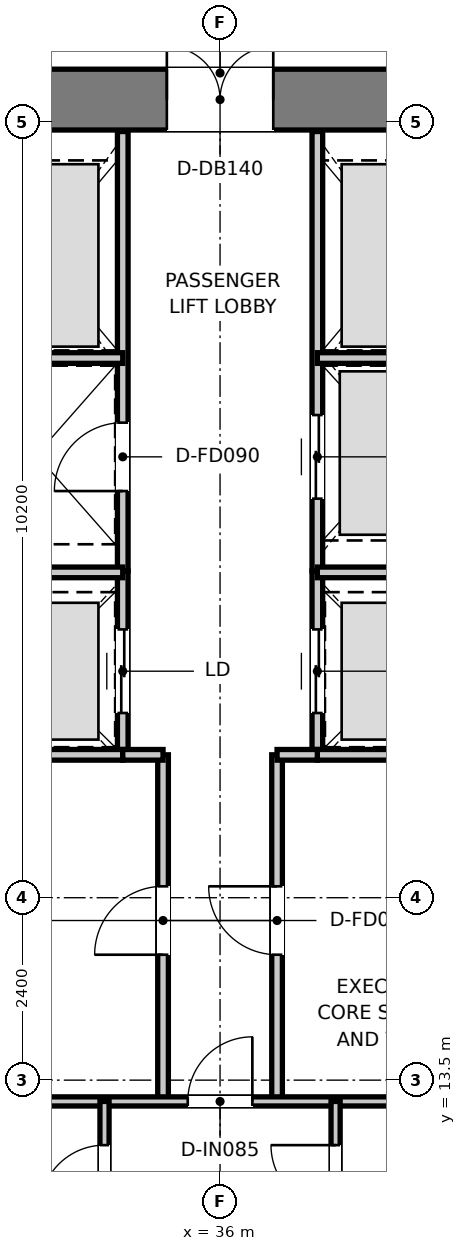
"""IFC4 building model, lengths in metres.
Left out: names, types, materials, properties, quantities, classifications, styles, units other than length and angle.
Written with IfcOpenShell. Run it as: python <this file> out.ifc"""

import sys

from ifc_helpers import new_model, si_unit, direction, frame, frame_2d, origin, place, context, subcontext, project, spatial, rectangle, extrude, element, fill, save


model = new_model("IFC4")
c1 = context("Model", 3, precision=1e-05, world=origin(), true_north=direction((0.0, 1.0)))
c2 = subcontext(c1, "Body", "Model", "MODEL_VIEW")
j1 = project(units=[si_unit("LENGTHUNIT", "METRE"), si_unit("PLANEANGLEUNIT", "RADIAN")], contexts=[c1])
p1 = place(None, origin())
s1 = spatial("IfcSite", under=j1, at=p1, CompositionType="ELEMENT")
p2 = place(p1, origin())
s2 = spatial("IfcBuilding", under=s1, at=p2, CompositionType="ELEMENT")
p3 = place(p2, frame((0.0, 0.0, 331.65)))
s3 = spatial("IfcBuildingStorey", under=s2, at=p3, CompositionType="ELEMENT", Elevation=331.65)
p4 = place(p3, frame((28.08, 26.4, 0.0), z_axis=(0.0, 0.0, 1.0), x_axis=(1.0, 0.0, 0.0)))
e1 = element("IfcWall", 1, at=p4, inside=s3, PredefinedType="SHEAR", context=c2, shape_type="SweptSolid", body=[
    extrude(rectangle(XDim=15.84, YDim=0.8, at=frame_2d((7.92, 0.0))), origin(), (0.0, 0.0, 1.0), 3.95),
])
p5 = place(p4, frame((7.22, 0.0, 0.0)))
e2 = element("IfcOpeningElement", 2, at=p5, cuts=e1, PredefinedType="OPENING", context=c2, shape_type="SweptSolid", body=[
    extrude(rectangle(XDim=1.4, YDim=2.2, at=frame_2d((0.7, 1.1))), frame((0.0, 0.41, 0.0), z_axis=(0.0, -1.0, 0.0), x_axis=(1.0, 0.0, 0.0)), (0.0, 0.0, 1.0), 0.82),
])
p6 = place(p4, frame((1.775, 0.0, 0.0)))
e3 = element("IfcOpeningElement", 3, at=p6, cuts=e1, PredefinedType="OPENING", context=c2, shape_type="SweptSolid", body=[
    extrude(rectangle(XDim=1.05, YDim=2.1, at=frame_2d((0.525, 1.05))), frame((0.0, 0.41, 0.0), z_axis=(0.0, -1.0, 0.0), x_axis=(1.0, 0.0, 0.0)), (0.0, 0.0, 1.0), 0.82),
])
p7 = place(p4, frame((13.015, 0.0, 0.0)))
e4 = element("IfcOpeningElement", 4, at=p7, cuts=e1, PredefinedType="OPENING", context=c2, shape_type="SweptSolid", body=[
    extrude(rectangle(XDim=1.05, YDim=2.1, at=frame_2d((0.525, 1.05))), frame((0.0, 0.41, 0.0), z_axis=(0.0, -1.0, 0.0), x_axis=(1.0, 0.0, 0.0)), (0.0, 0.0, 1.0), 0.82),
])
p8 = place(p3, frame((34.72, 20.2, 0.0), z_axis=(0.0, 0.0, 1.0), x_axis=(0.0, 1.0, 0.0)))
e5 = element("IfcWall", 5, at=p8, inside=s3, PredefinedType="PARTITIONING", context=c2, shape_type="SweptSolid", body=[
    extrude(rectangle(XDim=5.78, YDim=0.14, at=frame_2d((2.89, 0.0))), origin(), (0.0, 0.0, 1.0), 2.82),
])
p9 = place(p8, frame((1.05, 0.0, 0.0)))
e6 = element("IfcOpeningElement", 6, at=p9, cuts=e5, PredefinedType="OPENING", context=c2, shape_type="SweptSolid", body=[
    extrude(rectangle(XDim=0.9, YDim=2.1, at=frame_2d((0.45, 1.05))), frame((0.0, 0.08, 0.0), z_axis=(0.0, -1.0, 0.0), x_axis=(1.0, 0.0, 0.0)), (0.0, 0.0, 1.0), 0.16),
])
p10 = place(p3, frame((37.28, 20.2, 0.0), z_axis=(0.0, 0.0, 1.0), x_axis=(0.0, 1.0, 0.0)))
e7 = element("IfcWall", 7, at=p10, inside=s3, PredefinedType="PARTITIONING", context=c2, shape_type="SweptSolid", body=[
    extrude(rectangle(XDim=5.78, YDim=0.14, at=frame_2d((2.89, 0.0))), origin(), (0.0, 0.0, 1.0), 2.82),
])
p11 = place(p10, frame((0.95, 0.0, 0.0)))
e8 = element("IfcOpeningElement", 8, at=p11, cuts=e7, PredefinedType="OPENING", context=c2, shape_type="SweptSolid", body=[
    extrude(rectangle(XDim=1.1, YDim=2.15, at=frame_2d((0.55, 1.075))), frame((0.0, 0.08, 0.0), z_axis=(0.0, -1.0, 0.0), x_axis=(1.0, 0.0, 0.0)), (0.0, 0.0, 1.0), 0.16),
])
for number, where, z_axis, x_axis in (
    (9, (32.45, 23.0, 0.0), (0.0, 0.0, 1.0), (1.0, 0.0, 0.0)),
    (10, (37.28, 23.0, 0.0), (0.0, 0.0, 1.0), (1.0, 0.0, 0.0)),
):
    element("IfcWall", number, at=place(p3, frame(where, z_axis=z_axis, x_axis=x_axis)), inside=s3, PredefinedType="PARTITIONING", context=c2, shape_type="SweptSolid", body=[
        extrude(rectangle(XDim=2.27, YDim=0.14, at=frame_2d((1.135, 0.0))), origin(), (0.0, 0.0, 1.0), 2.82),
    ])
p12 = place(p3, frame((34.72, 17.78, 0.0), z_axis=(0.0, 0.0, 1.0), x_axis=(0.0, 1.0, 0.0)))
e11 = element("IfcWall", 11, at=p12, inside=s3, PredefinedType="PARTITIONING", context=c2, shape_type="SweptSolid", body=[
    extrude(rectangle(XDim=2.42, YDim=0.14, at=frame_2d((1.21, 0.0))), origin(), (0.0, 0.0, 1.0), 3.67),
])
p13 = place(p12, frame((0.55, 0.0, 0.0)))
e12 = element("IfcOpeningElement", 12, at=p13, cuts=e11, PredefinedType="OPENING", context=c2, shape_type="SweptSolid", body=[
    extrude(rectangle(XDim=1.1, YDim=2.15, at=frame_2d((0.55, 1.075))), frame((0.0, 0.08, 0.0), z_axis=(0.0, -1.0, 0.0), x_axis=(1.0, 0.0, 0.0)), (0.0, 0.0, 1.0), 0.16),
])
p14 = place(p3, frame((37.28, 17.78, 0.0), z_axis=(0.0, 0.0, 1.0), x_axis=(0.0, 1.0, 0.0)))
e13 = element("IfcWall", 13, at=p14, inside=s3, PredefinedType="PARTITIONING", context=c2, shape_type="SweptSolid", body=[
    extrude(rectangle(XDim=2.42, YDim=0.14, at=frame_2d((1.21, 0.0))), origin(), (0.0, 0.0, 1.0), 3.67),
])
p15 = place(p14, frame((0.55, 0.0, 0.0)))
e14 = element("IfcOpeningElement", 14, at=p15, cuts=e13, PredefinedType="OPENING", context=c2, shape_type="SweptSolid", body=[
    extrude(rectangle(XDim=1.1, YDim=2.15, at=frame_2d((0.55, 1.075))), frame((0.0, 0.08, 0.0), z_axis=(0.0, -1.0, 0.0), x_axis=(1.0, 0.0, 0.0)), (0.0, 0.0, 1.0), 0.16),
])
for number, where, z_axis, x_axis in (
    (15, (32.45, 17.78, 0.0), (0.0, 0.0, 1.0), (1.0, 0.0, 0.0)),
    (16, (32.45, 20.18, 0.0), (0.0, 0.0, 1.0), (1.0, 0.0, 0.0)),
    (17, (37.28, 17.78, 0.0), (0.0, 0.0, 1.0), (1.0, 0.0, 0.0)),
    (18, (37.28, 20.18, 0.0), (0.0, 0.0, 1.0), (1.0, 0.0, 0.0)),
):
    element("IfcWall", number, at=place(p3, frame(where, z_axis=z_axis, x_axis=x_axis)), inside=s3, PredefinedType="PARTITIONING", context=c2, shape_type="SweptSolid", body=[
        extrude(rectangle(XDim=2.27, YDim=0.14, at=frame_2d((1.135, 0.0))), origin(), (0.0, 0.0, 1.0), 3.67),
    ])
p16 = place(p3, frame((35.25, 13.22, 0.0), z_axis=(0.0, 0.0, 1.0), x_axis=(0.0, 1.0, 0.0)))
e19 = element("IfcWall", 19, at=p16, inside=s3, PredefinedType="PARTITIONING", context=c2, shape_type="SweptSolid", body=[
    extrude(rectangle(XDim=4.56, YDim=0.14, at=frame_2d((2.28, 0.0))), origin(), (0.0, 0.0, 1.0), 3.67),
])
p17 = place(p16, frame((1.93, 0.0, 0.0)))
e20 = element("IfcOpeningElement", 20, at=p17, cuts=e19, PredefinedType="OPENING", context=c2, shape_type="SweptSolid", body=[
    extrude(rectangle(XDim=0.9, YDim=2.1, at=frame_2d((0.45, 1.05))), frame((0.0, 0.08, 0.0), z_axis=(0.0, -1.0, 0.0), x_axis=(1.0, 0.0, 0.0)), (0.0, 0.0, 1.0), 0.16),
])
p18 = place(p3, frame((34.72, 17.78, 0.0), z_axis=(0.0, 0.0, 1.0), x_axis=(1.0, 0.0, 0.0)))
e21 = element("IfcWall", 21, at=p18, inside=s3, PredefinedType="PARTITIONING", context=c2, shape_type="SweptSolid", body=[
    extrude(rectangle(XDim=0.53, YDim=0.14, at=frame_2d((0.265, 0.0))), origin(), (0.0, 0.0, 1.0), 3.67),
])
p19 = place(p3, frame((36.75, 13.22, 0.0), z_axis=(0.0, 0.0, 1.0), x_axis=(0.0, 1.0, 0.0)))
e22 = element("IfcWall", 22, at=p19, inside=s3, PredefinedType="PARTITIONING", context=c2, shape_type="SweptSolid", body=[
    extrude(rectangle(XDim=4.56, YDim=0.14, at=frame_2d((2.28, 0.0))), origin(), (0.0, 0.0, 1.0), 3.67),
])
p20 = place(p19, frame((1.93, 0.0, 0.0)))
e23 = element("IfcOpeningElement", 23, at=p20, cuts=e22, PredefinedType="OPENING", context=c2, shape_type="SweptSolid", body=[
    extrude(rectangle(XDim=0.9, YDim=2.1, at=frame_2d((0.45, 1.05))), frame((0.0, 0.08, 0.0), z_axis=(0.0, -1.0, 0.0), x_axis=(1.0, 0.0, 0.0)), (0.0, 0.0, 1.0), 0.16),
])
p21 = place(p3, frame((36.75, 17.78, 0.0), z_axis=(0.0, 0.0, 1.0), x_axis=(1.0, 0.0, 0.0)))
e24 = element("IfcWall", 24, at=p21, inside=s3, PredefinedType="PARTITIONING", context=c2, shape_type="SweptSolid", body=[
    extrude(rectangle(XDim=0.53, YDim=0.14, at=frame_2d((0.265, 0.0))), origin(), (0.0, 0.0, 1.0), 3.67),
])
p22 = place(p3, frame((32.21, 13.22, 0.0), z_axis=(0.0, 0.0, 1.0), x_axis=(1.0, 0.0, 0.0)))
e25 = element("IfcWall", 25, at=p22, inside=s3, PredefinedType="PARTITIONING", context=c2, shape_type="SweptSolid", body=[
    extrude(rectangle(XDim=7.58, YDim=0.12, at=frame_2d((3.79, 0.0))), origin(), (0.0, 0.0, 1.0), 3.67),
])
p23 = place(p22, frame((3.365, 0.0, 0.0)))
e26 = element("IfcOpeningElement", 26, at=p23, cuts=e25, PredefinedType="OPENING", context=c2, shape_type="SweptSolid", body=[
    extrude(rectangle(XDim=0.85, YDim=2.1, at=frame_2d((0.425, 1.05))), frame((0.0, 0.07, 0.0), z_axis=(0.0, -1.0, 0.0), x_axis=(1.0, 0.0, 0.0)), (0.0, 0.0, 1.0), 0.14),
])
p24 = place(p3, frame((34.48, 11.25, 0.0), z_axis=(0.0, 0.0, 1.0), x_axis=(0.0, 1.0, 0.0)))
e27 = element("IfcWall", 27, at=p24, inside=s3, PredefinedType="PARTITIONING", context=c2, shape_type="SweptSolid", body=[
    extrude(rectangle(XDim=1.97, YDim=0.12, at=frame_2d((0.985, 0.0))), origin(), (0.0, 0.0, 1.0), 3.67),
])
p25 = place(p24, frame((0.545, 0.0, 0.0)))
e28 = element("IfcOpeningElement", 28, at=p25, cuts=e27, PredefinedType="OPENING", context=c2, shape_type="SweptSolid", body=[
    extrude(rectangle(XDim=0.85, YDim=2.1, at=frame_2d((0.425, 1.05))), frame((0.0, 0.07, 0.0), z_axis=(0.0, -1.0, 0.0), x_axis=(1.0, 0.0, 0.0)), (0.0, 0.0, 1.0), 0.14),
])
p26 = place(p3, frame((37.52, 11.25, 0.0), z_axis=(0.0, 0.0, 1.0), x_axis=(0.0, 1.0, 0.0)))
e29 = element("IfcWall", 29, at=p26, inside=s3, PredefinedType="PARTITIONING", context=c2, shape_type="SweptSolid", body=[
    extrude(rectangle(XDim=1.97, YDim=0.12, at=frame_2d((0.985, 0.0))), origin(), (0.0, 0.0, 1.0), 3.67),
])
p27 = place(p26, frame((0.545, 0.0, 0.0)))
e30 = element("IfcOpeningElement", 30, at=p27, cuts=e29, PredefinedType="OPENING", context=c2, shape_type="SweptSolid", body=[
    extrude(rectangle(XDim=0.85, YDim=2.1, at=frame_2d((0.425, 1.05))), frame((0.0, 0.07, 0.0), z_axis=(0.0, -1.0, 0.0), x_axis=(1.0, 0.0, 0.0)), (0.0, 0.0, 1.0), 0.14),
])
p28 = place(p5, origin())
e31 = element("IfcDoor", 31, at=p28, inside=s3, OperationType="DOUBLE_DOOR_SINGLE_SWING", PredefinedType="DOOR", context=c2, shape_type="SweptSolid", body=[
    extrude(rectangle(XDim=1.4, YDim=2.2, at=frame_2d((0.7, 1.1))), frame((0.0, 0.025, 0.0), z_axis=(0.0, -1.0, 0.0), x_axis=(1.0, 0.0, 0.0)), (0.0, 0.0, 1.0), 0.05),
])
fill(e2, e31)
p29 = place(p9, origin())
e32 = element("IfcDoor", 32, at=p29, inside=s3, OperationType="SINGLE_SWING_LEFT", PredefinedType="DOOR", context=c2, shape_type="SweptSolid", body=[
    extrude(rectangle(XDim=0.9, YDim=2.1, at=frame_2d((0.45, 1.05))), frame((0.0, 0.025, 0.0), z_axis=(0.0, -1.0, 0.0), x_axis=(1.0, 0.0, 0.0)), (0.0, 0.0, 1.0), 0.05),
])
fill(e6, e32)
p30 = place(p11, origin())
e33 = element("IfcDoor", 33, at=p30, inside=s3, OperationType="DOUBLE_DOOR_SLIDING", PredefinedType="DOOR", context=c2, shape_type="SweptSolid", body=[
    extrude(rectangle(XDim=1.1, YDim=2.15, at=frame_2d((0.55, 1.075))), frame((0.0, 0.025, 0.0), z_axis=(0.0, -1.0, 0.0), x_axis=(1.0, 0.0, 0.0)), (0.0, 0.0, 1.0), 0.05),
])
fill(e8, e33)
p31 = place(p13, origin())
e34 = element("IfcDoor", 34, at=p31, inside=s3, OperationType="DOUBLE_DOOR_SLIDING", PredefinedType="DOOR", context=c2, shape_type="SweptSolid", body=[
    extrude(rectangle(XDim=1.1, YDim=2.15, at=frame_2d((0.55, 1.075))), frame((0.0, 0.025, 0.0), z_axis=(0.0, -1.0, 0.0), x_axis=(1.0, 0.0, 0.0)), (0.0, 0.0, 1.0), 0.05),
])
fill(e12, e34)
p32 = place(p15, origin())
e35 = element("IfcDoor", 35, at=p32, inside=s3, OperationType="DOUBLE_DOOR_SLIDING", PredefinedType="DOOR", context=c2, shape_type="SweptSolid", body=[
    extrude(rectangle(XDim=1.1, YDim=2.15, at=frame_2d((0.55, 1.075))), frame((0.0, 0.025, 0.0), z_axis=(0.0, -1.0, 0.0), x_axis=(1.0, 0.0, 0.0)), (0.0, 0.0, 1.0), 0.05),
])
fill(e14, e35)
p33 = place(p17, origin())
e36 = element("IfcDoor", 36, at=p33, inside=s3, OperationType="SINGLE_SWING_LEFT", PredefinedType="DOOR", context=c2, shape_type="SweptSolid", body=[
    extrude(rectangle(XDim=0.9, YDim=2.1, at=frame_2d((0.45, 1.05))), frame((0.0, 0.025, 0.0), z_axis=(0.0, -1.0, 0.0), x_axis=(1.0, 0.0, 0.0)), (0.0, 0.0, 1.0), 0.05),
])
fill(e20, e36)
p34 = place(p20, origin())
e37 = element("IfcDoor", 37, at=p34, inside=s3, OperationType="SINGLE_SWING_RIGHT", PredefinedType="DOOR", context=c2, shape_type="SweptSolid", body=[
    extrude(rectangle(XDim=0.9, YDim=2.1, at=frame_2d((0.45, 1.05))), frame((0.0, 0.025, 0.0), z_axis=(0.0, -1.0, 0.0), x_axis=(1.0, 0.0, 0.0)), (0.0, 0.0, 1.0), 0.05),
])
fill(e23, e37)
p35 = place(p23, origin())
e38 = element("IfcDoor", 38, at=p35, inside=s3, OperationType="SINGLE_SWING_RIGHT", PredefinedType="DOOR", context=c2, shape_type="SweptSolid", body=[
    extrude(rectangle(XDim=0.85, YDim=2.1, at=frame_2d((0.425, 1.05))), frame((0.0, 0.025, 0.0), z_axis=(0.0, -1.0, 0.0), x_axis=(1.0, 0.0, 0.0)), (0.0, 0.0, 1.0), 0.05),
])
fill(e26, e38)
p36 = place(p25, origin())
e39 = element("IfcDoor", 39, at=p36, inside=s3, OperationType="SINGLE_SWING_LEFT", PredefinedType="DOOR", context=c2, shape_type="SweptSolid", body=[
    extrude(rectangle(XDim=0.85, YDim=2.1, at=frame_2d((0.425, 1.05))), frame((0.0, 0.025, 0.0), z_axis=(0.0, -1.0, 0.0), x_axis=(1.0, 0.0, 0.0)), (0.0, 0.0, 1.0), 0.05),
])
fill(e28, e39)
p37 = place(p27, origin())
e40 = element("IfcDoor", 40, at=p37, inside=s3, OperationType="SINGLE_SWING_RIGHT", PredefinedType="DOOR", context=c2, shape_type="SweptSolid", body=[
    extrude(rectangle(XDim=0.85, YDim=2.1, at=frame_2d((0.425, 1.05))), frame((0.0, 0.025, 0.0), z_axis=(0.0, -1.0, 0.0), x_axis=(1.0, 0.0, 0.0)), (0.0, 0.0, 1.0), 0.05),
])
fill(e30, e40)
save(model, sys.argv[1])
